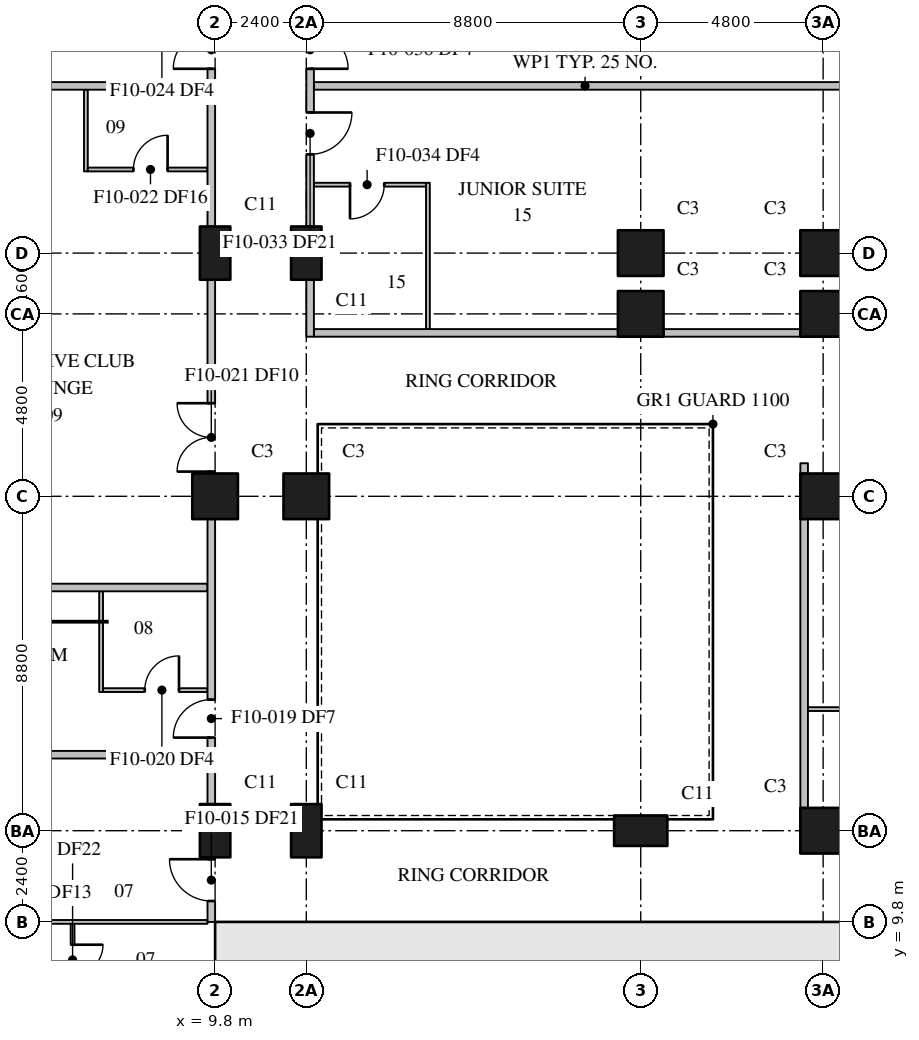
"""IFC4 building model, lengths in metres.
Left out: names, types, materials, properties, quantities, classifications, styles, units other than length and angle.
Written with IfcOpenShell. Run it as: python <this file> out.ifc"""

import sys

from ifc_helpers import new_model, si_unit, direction, frame, frame_2d, origin, origin_2d, place, context, subcontext, project, spatial, rectangle, extrude, element, fill, save


model = new_model("IFC4")
c1 = context("Model", 3, precision=1e-05, world=origin(), true_north=direction((0.0, 1.0)))
c2 = subcontext(c1, "Body", "Model", "MODEL_VIEW")
j1 = project(units=[si_unit("LENGTHUNIT", "METRE"), si_unit("PLANEANGLEUNIT", "RADIAN")], contexts=[c1])
p1 = place(None, origin())
s1 = spatial("IfcSite", under=j1, at=p1, CompositionType="ELEMENT")
p2 = place(p1, origin())
s2 = spatial("IfcBuilding", under=s1, at=p2, CompositionType="ELEMENT")
p3 = place(p2, frame((0.0, 0.0, 101.9)))
s3 = spatial("IfcBuildingStorey", under=s2, at=p3, CompositionType="ELEMENT", Elevation=101.9)
p4 = place(p3, frame((9.8, 12.2, 0.0), z_axis=(0.0, 0.0, 1.0), x_axis=(0.0, 1.0, 0.0)))
e1 = element("IfcColumn", 1, at=p4, inside=s3, PredefinedType="COLUMN", context=c2, shape_type="SweptSolid", body=[
    extrude(rectangle(XDim=1.4, YDim=0.8, at=origin_2d()), origin(), (0.0, 0.0, 1.0), 5.5),
])
p5 = place(p3, frame((9.8, 21.0, 0.0), z_axis=(0.0, 0.0, 1.0), x_axis=(1.0, 0.0, 0.0)))
e2 = element("IfcColumn", 2, at=p5, inside=s3, PredefinedType="COLUMN", context=c2, shape_type="SweptSolid", body=[
    extrude(rectangle(XDim=1.2, YDim=1.2, at=origin_2d()), origin(), (0.0, 0.0, 1.0), 5.5),
])
for number, where, z_axis, x_axis in (
    (3, (9.8, 27.4, 0.0), (0.0, 0.0, 1.0), (0.0, 1.0, 0.0)),
    (4, (12.2, 12.2, 0.0), (0.0, 0.0, 1.0), (0.0, 1.0, 0.0)),
):
    element("IfcColumn", number, at=place(p3, frame(where, z_axis=z_axis, x_axis=x_axis)), inside=s3, PredefinedType="COLUMN", context=c2, shape_type="SweptSolid", body=[
        extrude(rectangle(XDim=1.4, YDim=0.8, at=origin_2d()), origin(), (0.0, 0.0, 1.0), 5.5),
    ])
p6 = place(p3, frame((12.2, 21.0, 0.0), z_axis=(0.0, 0.0, 1.0), x_axis=(1.0, 0.0, 0.0)))
e5 = element("IfcColumn", 5, at=p6, inside=s3, PredefinedType="COLUMN", context=c2, shape_type="SweptSolid", body=[
    extrude(rectangle(XDim=1.2, YDim=1.2, at=origin_2d()), origin(), (0.0, 0.0, 1.0), 5.5),
])
for number, where, z_axis, x_axis in (
    (6, (12.2, 27.4, 0.0), (0.0, 0.0, 1.0), (0.0, 1.0, 0.0)),
    (7, (21.0, 12.2, 0.0), (0.0, 0.0, 1.0), (1.0, 0.0, 0.0)),
):
    element("IfcColumn", number, at=place(p3, frame(where, z_axis=z_axis, x_axis=x_axis)), inside=s3, PredefinedType="COLUMN", context=c2, shape_type="SweptSolid", body=[
        extrude(rectangle(XDim=1.4, YDim=0.8, at=origin_2d()), origin(), (0.0, 0.0, 1.0), 5.5),
    ])
for number, where, z_axis, x_axis in (
    (8, (21.0, 25.8, 0.0), (0.0, 0.0, 1.0), (1.0, 0.0, 0.0)),
    (9, (21.0, 27.4, 0.0), (0.0, 0.0, 1.0), (1.0, 0.0, 0.0)),
    (10, (25.8, 12.2, 0.0), (0.0, 0.0, 1.0), (1.0, 0.0, 0.0)),
    (11, (25.8, 21.0, 0.0), (0.0, 0.0, 1.0), (1.0, 0.0, 0.0)),
    (12, (25.8, 25.8, 0.0), (0.0, 0.0, 1.0), (1.0, 0.0, 0.0)),
    (13, (25.8, 27.4, 0.0), (0.0, 0.0, 1.0), (1.0, 0.0, 0.0)),
):
    element("IfcColumn", number, at=place(p3, frame(where, z_axis=z_axis, x_axis=x_axis)), inside=s3, PredefinedType="COLUMN", context=c2, shape_type="SweptSolid", body=[
        extrude(rectangle(XDim=1.2, YDim=1.2, at=origin_2d()), origin(), (0.0, 0.0, 1.0), 5.5),
    ])
p7 = place(p3, frame((10.6, 1.2, 0.0), z_axis=(0.0, 0.0, 1.0), x_axis=(0.0, 1.0, 0.0)))
e14 = element("IfcWall", 14, at=p7, inside=s3, PredefinedType="SHEAR", context=c2, shape_type="SweptSolid", body=[
    extrude(rectangle(XDim=8.6, YDim=0.8, at=frame_2d((4.3, 0.0))), origin(), (0.0, 0.0, 1.0), 5.5),
])
p8 = place(p3, frame((9.8, 9.6, 0.0), z_axis=(0.0, 0.0, 1.0), x_axis=(1.0, 0.0, 0.0)))
e15 = element("IfcWall", 15, at=p8, inside=s3, PredefinedType="SHEAR", context=c2, shape_type="SweptSolid", body=[
    extrude(rectangle(XDim=4.3, YDim=0.4, at=frame_2d((2.15, 0.0))), origin(), (0.0, 0.0, 1.0), 5.5),
])
p9 = place(p8, frame((2.05, 0.0, 0.0)))
e16 = element("IfcOpeningElement", 16, at=p9, cuts=e15, PredefinedType="OPENING", context=c2, shape_type="SweptSolid", body=[
    extrude(rectangle(XDim=1.2, YDim=2.1, at=frame_2d((0.6, 1.05))), frame((0.0, 0.21, 0.0), z_axis=(0.0, -1.0, 0.0), x_axis=(1.0, 0.0, 0.0)), (0.0, 0.0, 1.0), 0.42),
])
p10 = place(p3, frame((14.1, 9.6, 0.0), z_axis=(0.0, 0.0, 1.0), x_axis=(1.0, 0.0, 0.0)))
e17 = element("IfcWall", 17, at=p10, inside=s3, PredefinedType="SHEAR", context=c2, shape_type="SweptSolid", body=[
    extrude(rectangle(XDim=10.4, YDim=0.4, at=frame_2d((5.2, 0.0))), origin(), (0.0, 0.0, 1.0), 5.5),
])
p11 = place(p3, frame((14.1, 1.2, 0.0), z_axis=(0.0, 0.0, 1.0), x_axis=(0.0, 1.0, 0.0)))
e18 = element("IfcWall", 18, at=p11, inside=s3, PredefinedType="SHEAR", context=c2, shape_type="SweptSolid", body=[
    extrude(rectangle(XDim=8.4, YDim=0.4, at=frame_2d((4.2, 0.0))), origin(), (0.0, 0.0, 1.0), 5.5),
])
p12 = place(p11, frame((4.45, 0.0, 0.0)))
e19 = element("IfcOpeningElement", 19, at=p12, cuts=e18, PredefinedType="OPENING", context=c2, shape_type="SweptSolid", body=[
    extrude(rectangle(XDim=0.9, YDim=2.1, at=frame_2d((0.45, 1.05))), frame((0.0, 0.21, 0.0), z_axis=(0.0, -1.0, 0.0), x_axis=(1.0, 0.0, 0.0)), (0.0, 0.0, 1.0), 0.42),
])
for number, where, z_axis, x_axis in (
    (20, (16.7, 7.0, 0.0), (0.0, 0.0, 1.0), (0.0, 1.0, 0.0)),
    (21, (19.3, 7.0, 0.0), (0.0, 0.0, 1.0), (0.0, 1.0, 0.0)),
    (22, (21.9, 7.0, 0.0), (0.0, 0.0, 1.0), (0.0, 1.0, 0.0)),
    (23, (24.5, 7.0, 0.0), (0.0, 0.0, 1.0), (0.0, 1.0, 0.0)),
):
    element("IfcWall", number, at=place(p3, frame(where, z_axis=z_axis, x_axis=x_axis)), inside=s3, PredefinedType="SHEAR", context=c2, shape_type="SweptSolid", body=[
        extrude(rectangle(XDim=2.4, YDim=0.25, at=frame_2d((1.2, 0.0))), origin(), (0.0, 0.0, 1.0), 5.5),
    ])
p13 = place(p3, frame((25.3, 12.8, 0.0), z_axis=(0.0, 0.0, 1.0), x_axis=(0.0, 1.0, 0.0)))
e24 = element("IfcWall", 24, at=p13, inside=s3, PredefinedType="PARTITIONING", context=c2, shape_type="SweptSolid", body=[
    extrude(rectangle(XDim=7.6, YDim=0.2, at=frame_2d((3.8, 0.0))), origin(), (0.0, 0.0, 1.0), 5.2),
])
p14 = place(p3, frame((25.3, 21.6, 0.0), z_axis=(0.0, 0.0, 1.0), x_axis=(0.0, 1.0, 0.0)))
e25 = element("IfcWall", 25, at=p14, inside=s3, PredefinedType="PARTITIONING", context=c2, shape_type="SweptSolid", body=[
    extrude(rectangle(XDim=0.27, YDim=0.2, at=frame_2d((0.135, 0.0))), origin(), (0.0, 0.0, 1.0), 5.2),
])
p15 = place(p3, frame((9.7, 9.8, 0.0), z_axis=(0.0, 0.0, 1.0), x_axis=(0.0, 1.0, 0.0)))
e26 = element("IfcWall", 26, at=p15, inside=s3, PredefinedType="PARTITIONING", context=c2, shape_type="SweptSolid", body=[
    extrude(rectangle(XDim=1.7, YDim=0.2, at=frame_2d((0.85, 0.0))), origin(), (0.0, 0.0, 1.0), 5.2),
])
p16 = place(p15, frame((0.55, 0.0, 0.0)))
e27 = element("IfcOpeningElement", 27, at=p16, cuts=e26, PredefinedType="OPENING", context=c2, shape_type="SweptSolid", body=[
    extrude(rectangle(XDim=1.1, YDim=2.1, at=frame_2d((0.55, 1.05))), frame((0.0, 0.11, 0.0), z_axis=(0.0, -1.0, 0.0), x_axis=(1.0, 0.0, 0.0)), (0.0, 0.0, 1.0), 0.22),
])
p17 = place(p3, frame((9.7, 12.9, 0.0), z_axis=(0.0, 0.0, 1.0), x_axis=(0.0, 1.0, 0.0)))
e28 = element("IfcWall", 28, at=p17, inside=s3, PredefinedType="PARTITIONING", context=c2, shape_type="SweptSolid", body=[
    extrude(rectangle(XDim=7.5, YDim=0.2, at=frame_2d((3.75, 0.0))), origin(), (0.0, 0.0, 1.0), 5.2),
])
p18 = place(p17, frame((1.75, 0.0, 0.0)))
e29 = element("IfcOpeningElement", 29, at=p18, cuts=e28, PredefinedType="OPENING", context=c2, shape_type="SweptSolid", body=[
    extrude(rectangle(XDim=1.0, YDim=2.1, at=frame_2d((0.5, 1.05))), frame((0.0, 0.11, 0.0), z_axis=(0.0, -1.0, 0.0), x_axis=(1.0, 0.0, 0.0)), (0.0, 0.0, 1.0), 0.22),
])
p19 = place(p3, frame((9.7, 21.6, 0.0), z_axis=(0.0, 0.0, 1.0), x_axis=(0.0, 1.0, 0.0)))
e30 = element("IfcWall", 30, at=p19, inside=s3, PredefinedType="PARTITIONING", context=c2, shape_type="SweptSolid", body=[
    extrude(rectangle(XDim=5.1, YDim=0.2, at=frame_2d((2.55, 0.0))), origin(), (0.0, 0.0, 1.0), 5.2),
])
p20 = place(p19, frame((0.05, 0.0, 0.0)))
e31 = element("IfcOpeningElement", 31, at=p20, cuts=e30, PredefinedType="OPENING", context=c2, shape_type="SweptSolid", body=[
    extrude(rectangle(XDim=1.8, YDim=2.1, at=frame_2d((0.9, 1.05))), frame((0.0, 0.11, 0.0), z_axis=(0.0, -1.0, 0.0), x_axis=(1.0, 0.0, 0.0)), (0.0, 0.0, 1.0), 0.22),
])
p21 = place(p3, frame((9.7, 28.1, 0.0), z_axis=(0.0, 0.0, 1.0), x_axis=(0.0, 1.0, 0.0)))
e32 = element("IfcWall", 32, at=p21, inside=s3, PredefinedType="PARTITIONING", context=c2, shape_type="SweptSolid", body=[
    extrude(rectangle(XDim=7.4, YDim=0.2, at=frame_2d((3.7, 0.0))), origin(), (0.0, 0.0, 1.0), 5.2),
])
p22 = place(p21, frame((4.15, 0.0, 0.0)))
e33 = element("IfcOpeningElement", 33, at=p22, cuts=e32, PredefinedType="OPENING", context=c2, shape_type="SweptSolid", body=[
    extrude(rectangle(XDim=1.0, YDim=2.1, at=frame_2d((0.5, 1.05))), frame((0.0, 0.11, 0.0), z_axis=(0.0, -1.0, 0.0), x_axis=(1.0, 0.0, 0.0)), (0.0, 0.0, 1.0), 0.22),
])
for number, where, z_axis, x_axis in (
    (34, (0.31, 14.2, 0.0), (0.0, 0.0, 1.0), (1.0, 0.0, 0.0)),
    (35, (0.31, 18.6, 0.0), (0.0, 0.0, 1.0), (1.0, 0.0, 0.0)),
    (36, (0.31, 31.8, 0.0), (0.0, 0.0, 1.0), (1.0, 0.0, 0.0)),
):
    element("IfcWall", number, at=place(p3, frame(where, z_axis=z_axis, x_axis=x_axis)), inside=s3, PredefinedType="PARTITIONING", context=c2, shape_type="SweptSolid", body=[
        extrude(rectangle(XDim=9.29, YDim=0.2, at=frame_2d((4.645, 0.0))), origin(), (0.0, 0.0, 1.0), 5.2),
    ])
p23 = place(p3, frame((12.4, 31.8, 0.0), z_axis=(0.0, 0.0, 1.0), x_axis=(1.0, 0.0, 0.0)))
e37 = element("IfcWall", 37, at=p23, inside=s3, PredefinedType="PARTITIONING", context=c2, shape_type="SweptSolid", body=[
    extrude(rectangle(XDim=14.27, YDim=0.2, at=frame_2d((7.135, 0.0))), origin(), (0.0, 0.0, 1.0), 5.2),
])
p24 = place(p3, frame((12.3, 25.2, 0.0), z_axis=(0.0, 0.0, 1.0), x_axis=(0.0, 1.0, 0.0)))
e38 = element("IfcWall", 38, at=p24, inside=s3, PredefinedType="PARTITIONING", context=c2, shape_type="SweptSolid", body=[
    extrude(rectangle(XDim=1.5, YDim=0.2, at=frame_2d((0.75, 0.0))), origin(), (0.0, 0.0, 1.0), 5.2),
])
p25 = place(p3, frame((12.3, 35.5, 0.0), z_axis=(0.0, 0.0, 1.0), x_axis=(0.0, -1.0, 0.0)))
e39 = element("IfcWall", 39, at=p25, inside=s3, PredefinedType="PARTITIONING", context=c2, shape_type="SweptSolid", body=[
    extrude(rectangle(XDim=7.4, YDim=0.2, at=frame_2d((3.7, 0.0))), origin(), (0.0, 0.0, 1.0), 5.2),
])
p26 = place(p25, frame((4.4, 0.0, 0.0)))
e40 = element("IfcOpeningElement", 40, at=p26, cuts=e39, PredefinedType="OPENING", context=c2, shape_type="SweptSolid", body=[
    extrude(rectangle(XDim=1.1, YDim=2.1, at=frame_2d((0.55, 1.05))), frame((0.0, 0.11, 0.0), z_axis=(0.0, -1.0, 0.0), x_axis=(1.0, 0.0, 0.0)), (0.0, 0.0, 1.0), 0.22),
])
p27 = place(p25, frame((2.25, 0.0, 0.0)))
e41 = element("IfcOpeningElement", 41, at=p27, cuts=e39, PredefinedType="OPENING", context=c2, shape_type="SweptSolid", body=[
    extrude(rectangle(XDim=1.0, YDim=2.1, at=frame_2d((0.5, 1.05))), frame((0.0, 0.11, 0.0), z_axis=(0.0, -1.0, 0.0), x_axis=(1.0, 0.0, 0.0)), (0.0, 0.0, 1.0), 0.22),
])
p28 = place(p3, frame((12.4, 25.3, 0.0), z_axis=(0.0, 0.0, 1.0), x_axis=(1.0, 0.0, 0.0)))
e42 = element("IfcWall", 42, at=p28, inside=s3, PredefinedType="PARTITIONING", context=c2, shape_type="SweptSolid", body=[
    extrude(rectangle(XDim=8.0, YDim=0.2, at=frame_2d((4.0, 0.0))), origin(), (0.0, 0.0, 1.0), 5.2),
])
p29 = place(p3, frame((21.6, 25.3, 0.0), z_axis=(0.0, 0.0, 1.0), x_axis=(1.0, 0.0, 0.0)))
e43 = element("IfcWall", 43, at=p29, inside=s3, PredefinedType="PARTITIONING", context=c2, shape_type="SweptSolid", body=[
    extrude(rectangle(XDim=3.6, YDim=0.2, at=frame_2d((1.8, 0.0))), origin(), (0.0, 0.0, 1.0), 5.2),
])
p30 = place(p3, frame((25.4, 15.4, 0.0), z_axis=(0.0, 0.0, 1.0), x_axis=(1.0, 0.0, 0.0)))
e44 = element("IfcWall", 44, at=p30, inside=s3, PredefinedType="PARTITIONING", context=c2, shape_type="SweptSolid", body=[
    extrude(rectangle(XDim=3.15, YDim=0.1, at=frame_2d((1.575, 0.0))), origin(), (0.0, 0.0, 1.0), 5.2),
])
p31 = place(p3, frame((6.05, 9.75, 0.0), z_axis=(0.0, 0.0, 1.0), x_axis=(0.0, -1.0, 0.0)))
e45 = element("IfcWall", 45, at=p31, inside=s3, PredefinedType="PARTITIONING", context=c2, shape_type="SweptSolid", body=[
    extrude(rectangle(XDim=4.4, YDim=0.1, at=frame_2d((2.2, 0.0))), origin(), (0.0, 0.0, 1.0), 5.2),
])
p32 = place(p31, frame((2.7, 0.0, 0.0)))
e46 = element("IfcOpeningElement", 46, at=p32, cuts=e45, PredefinedType="OPENING", context=c2, shape_type="SweptSolid", body=[
    extrude(rectangle(XDim=0.9, YDim=2.1, at=frame_2d((0.45, 1.05))), frame((0.0, 0.06, 0.0), z_axis=(0.0, -1.0, 0.0), x_axis=(1.0, 0.0, 0.0)), (0.0, 0.0, 1.0), 0.12),
])
p33 = place(p31, frame((0.55, 0.0, 0.0)))
e47 = element("IfcOpeningElement", 47, at=p33, cuts=e45, PredefinedType="OPENING", context=c2, shape_type="SweptSolid", body=[
    extrude(rectangle(XDim=0.8, YDim=2.1, at=frame_2d((0.4, 1.05))), frame((0.0, 0.06, 0.0), z_axis=(0.0, -1.0, 0.0), x_axis=(1.0, 0.0, 0.0)), (0.0, 0.0, 1.0), 0.12),
])
p34 = place(p3, frame((9.6, 9.8, 0.0), z_axis=(0.0, 0.0, 1.0), x_axis=(-1.0, 0.0, 0.0)))
e48 = element("IfcWall", 48, at=p34, inside=s3, PredefinedType="PARTITIONING", context=c2, shape_type="SweptSolid", body=[
    extrude(rectangle(XDim=8.0, YDim=0.1, at=frame_2d((4.0, 0.0))), origin(), (0.0, 0.0, 1.0), 5.2),
])
p35 = place(p34, frame((4.65, 0.0, 0.0)))
e49 = element("IfcOpeningElement", 49, at=p35, cuts=e48, PredefinedType="OPENING", context=c2, shape_type="SweptSolid", body=[
    extrude(rectangle(XDim=1.0, YDim=2.1, at=frame_2d((0.5, 1.05))), frame((0.0, 0.06, 0.0), z_axis=(0.0, -1.0, 0.0), x_axis=(1.0, 0.0, 0.0)), (0.0, 0.0, 1.0), 0.12),
])
p36 = place(p3, frame((6.8, 15.85, 0.0), z_axis=(0.0, 0.0, 1.0), x_axis=(0.0, 1.0, 0.0)))
e50 = element("IfcWall", 50, at=p36, inside=s3, PredefinedType="PARTITIONING", context=c2, shape_type="SweptSolid", body=[
    extrude(rectangle(XDim=2.65, YDim=0.1, at=frame_2d((1.325, 0.0))), origin(), (0.0, 0.0, 1.0), 5.2),
])
p37 = place(p3, frame((6.85, 15.9, 0.0), z_axis=(0.0, 0.0, 1.0), x_axis=(1.0, 0.0, 0.0)))
e51 = element("IfcWall", 51, at=p37, inside=s3, PredefinedType="PARTITIONING", context=c2, shape_type="SweptSolid", body=[
    extrude(rectangle(XDim=2.75, YDim=0.1, at=frame_2d((1.375, 0.0))), origin(), (0.0, 0.0, 1.0), 5.2),
])
p38 = place(p37, frame((1.1, 0.0, 0.0)))
e52 = element("IfcOpeningElement", 52, at=p38, cuts=e51, PredefinedType="OPENING", context=c2, shape_type="SweptSolid", body=[
    extrude(rectangle(XDim=0.9, YDim=2.1, at=frame_2d((0.45, 1.05))), frame((0.0, 0.06, 0.0), z_axis=(0.0, -1.0, 0.0), x_axis=(1.0, 0.0, 0.0)), (0.0, 0.0, 1.0), 0.12),
])
p39 = place(p3, frame((6.4, 29.55, 0.0), z_axis=(0.0, 0.0, 1.0), x_axis=(0.0, 1.0, 0.0)))
e53 = element("IfcWall", 53, at=p39, inside=s3, PredefinedType="PARTITIONING", context=c2, shape_type="SweptSolid", body=[
    extrude(rectangle(XDim=2.15, YDim=0.1, at=frame_2d((1.075, 0.0))), origin(), (0.0, 0.0, 1.0), 5.2),
])
p40 = place(p3, frame((6.45, 29.6, 0.0), z_axis=(0.0, 0.0, 1.0), x_axis=(1.0, 0.0, 0.0)))
e54 = element("IfcWall", 54, at=p40, inside=s3, PredefinedType="PARTITIONING", context=c2, shape_type="SweptSolid", body=[
    extrude(rectangle(XDim=3.15, YDim=0.1, at=frame_2d((1.575, 0.0))), origin(), (0.0, 0.0, 1.0), 5.2),
])
p41 = place(p40, frame((1.2, 0.0, 0.0)))
e55 = element("IfcOpeningElement", 55, at=p41, cuts=e54, PredefinedType="OPENING", context=c2, shape_type="SweptSolid", body=[
    extrude(rectangle(XDim=0.9, YDim=2.1, at=frame_2d((0.45, 1.05))), frame((0.0, 0.06, 0.0), z_axis=(0.0, -1.0, 0.0), x_axis=(1.0, 0.0, 0.0)), (0.0, 0.0, 1.0), 0.12),
])
p42 = place(p3, frame((15.4, 25.4, 0.0), z_axis=(0.0, 0.0, 1.0), x_axis=(0.0, 1.0, 0.0)))
e56 = element("IfcWall", 56, at=p42, inside=s3, PredefinedType="PARTITIONING", context=c2, shape_type="SweptSolid", body=[
    extrude(rectangle(XDim=3.85, YDim=0.1, at=frame_2d((1.925, 0.0))), origin(), (0.0, 0.0, 1.0), 5.2),
])
p43 = place(p3, frame((15.35, 29.2, 0.0), z_axis=(0.0, 0.0, 1.0), x_axis=(-1.0, 0.0, 0.0)))
e57 = element("IfcWall", 57, at=p43, inside=s3, PredefinedType="PARTITIONING", context=c2, shape_type="SweptSolid", body=[
    extrude(rectangle(XDim=2.95, YDim=0.1, at=frame_2d((1.475, 0.0))), origin(), (0.0, 0.0, 1.0), 5.2),
])
p44 = place(p43, frame((1.1, 0.0, 0.0)))
e58 = element("IfcOpeningElement", 58, at=p44, cuts=e57, PredefinedType="OPENING", context=c2, shape_type="SweptSolid", body=[
    extrude(rectangle(XDim=0.9, YDim=2.1, at=frame_2d((0.45, 1.05))), frame((0.0, 0.06, 0.0), z_axis=(0.0, -1.0, 0.0), x_axis=(1.0, 0.0, 0.0)), (0.0, 0.0, 1.0), 0.12),
])
p45 = place(p9, frame((1.2, 0.0, 0.0), z_axis=(0.0, 0.0, 1.0), x_axis=(-1.0, 0.0, 0.0)))
e59 = element("IfcDoor", 59, at=p45, inside=s3, OperationType="SINGLE_SWING_LEFT", PredefinedType="DOOR", context=c2, shape_type="SweptSolid", body=[
    extrude(rectangle(XDim=1.2, YDim=2.1, at=frame_2d((0.6, 1.05))), frame((0.0, 0.025, 0.0), z_axis=(0.0, -1.0, 0.0), x_axis=(1.0, 0.0, 0.0)), (0.0, 0.0, 1.0), 0.05),
])
fill(e16, e59)
p46 = place(p16, origin())
e60 = element("IfcDoor", 60, at=p46, inside=s3, OperationType="SINGLE_SWING_RIGHT", PredefinedType="DOOR", context=c2, shape_type="SweptSolid", body=[
    extrude(rectangle(XDim=1.1, YDim=2.1, at=frame_2d((0.55, 1.05))), frame((0.0, 0.025, 0.0), z_axis=(0.0, -1.0, 0.0), x_axis=(1.0, 0.0, 0.0)), (0.0, 0.0, 1.0), 0.05),
])
fill(e27, e60)
p47 = place(p33, origin())
e61 = element("IfcDoor", 61, at=p47, inside=s3, OperationType="SINGLE_SWING_LEFT", PredefinedType="DOOR", context=c2, shape_type="SweptSolid", body=[
    extrude(rectangle(XDim=0.8, YDim=2.1, at=frame_2d((0.4, 1.05))), frame((0.0, 0.025, 0.0), z_axis=(0.0, -1.0, 0.0), x_axis=(1.0, 0.0, 0.0)), (0.0, 0.0, 1.0), 0.05),
])
fill(e47, e61)
p48 = place(p18, origin())
e62 = element("IfcDoor", 62, at=p48, inside=s3, OperationType="SINGLE_SWING_LEFT", PredefinedType="DOOR", context=c2, shape_type="SweptSolid", body=[
    extrude(rectangle(XDim=1.0, YDim=2.1, at=frame_2d((0.5, 1.05))), frame((0.0, 0.025, 0.0), z_axis=(0.0, -1.0, 0.0), x_axis=(1.0, 0.0, 0.0)), (0.0, 0.0, 1.0), 0.05),
])
fill(e29, e62)
p49 = place(p38, origin())
e63 = element("IfcDoor", 63, at=p49, inside=s3, OperationType="SINGLE_SWING_RIGHT", PredefinedType="DOOR", context=c2, shape_type="SweptSolid", body=[
    extrude(rectangle(XDim=0.9, YDim=2.1, at=frame_2d((0.45, 1.05))), frame((0.0, 0.025, 0.0), z_axis=(0.0, -1.0, 0.0), x_axis=(1.0, 0.0, 0.0)), (0.0, 0.0, 1.0), 0.05),
])
fill(e52, e63)
p50 = place(p20, origin())
e64 = element("IfcDoor", 64, at=p50, inside=s3, OperationType="DOUBLE_DOOR_SINGLE_SWING", PredefinedType="DOOR", context=c2, shape_type="SweptSolid", body=[
    extrude(rectangle(XDim=1.8, YDim=2.1, at=frame_2d((0.9, 1.05))), frame((0.0, 0.025, 0.0), z_axis=(0.0, -1.0, 0.0), x_axis=(1.0, 0.0, 0.0)), (0.0, 0.0, 1.0), 0.05),
])
fill(e31, e64)
p51 = place(p41, origin())
e65 = element("IfcDoor", 65, at=p51, inside=s3, OperationType="SINGLE_SWING_RIGHT", PredefinedType="DOOR", context=c2, shape_type="SweptSolid", body=[
    extrude(rectangle(XDim=0.9, YDim=2.1, at=frame_2d((0.45, 1.05))), frame((0.0, 0.025, 0.0), z_axis=(0.0, -1.0, 0.0), x_axis=(1.0, 0.0, 0.0)), (0.0, 0.0, 1.0), 0.05),
])
fill(e55, e65)
p52 = place(p22, origin())
e66 = element("IfcDoor", 66, at=p52, inside=s3, OperationType="SINGLE_SWING_LEFT", PredefinedType="DOOR", context=c2, shape_type="SweptSolid", body=[
    extrude(rectangle(XDim=1.0, YDim=2.1, at=frame_2d((0.5, 1.05))), frame((0.0, 0.025, 0.0), z_axis=(0.0, -1.0, 0.0), x_axis=(1.0, 0.0, 0.0)), (0.0, 0.0, 1.0), 0.05),
])
fill(e33, e66)
p53 = place(p26, origin())
e67 = element("IfcDoor", 67, at=p53, inside=s3, OperationType="SINGLE_SWING_LEFT", PredefinedType="DOOR", context=c2, shape_type="SweptSolid", body=[
    extrude(rectangle(XDim=1.1, YDim=2.1, at=frame_2d((0.55, 1.05))), frame((0.0, 0.025, 0.0), z_axis=(0.0, -1.0, 0.0), x_axis=(1.0, 0.0, 0.0)), (0.0, 0.0, 1.0), 0.05),
])
fill(e40, e67)
p54 = place(p44, origin())
e68 = element("IfcDoor", 68, at=p54, inside=s3, OperationType="SINGLE_SWING_RIGHT", PredefinedType="DOOR", context=c2, shape_type="SweptSolid", body=[
    extrude(rectangle(XDim=0.9, YDim=2.1, at=frame_2d((0.45, 1.05))), frame((0.0, 0.025, 0.0), z_axis=(0.0, -1.0, 0.0), x_axis=(1.0, 0.0, 0.0)), (0.0, 0.0, 1.0), 0.05),
])
fill(e58, e68)
p55 = place(p27, origin())
e69 = element("IfcDoor", 69, at=p55, inside=s3, OperationType="SINGLE_SWING_RIGHT", PredefinedType="DOOR", context=c2, shape_type="SweptSolid", body=[
    extrude(rectangle(XDim=1.0, YDim=2.1, at=frame_2d((0.5, 1.05))), frame((0.0, 0.025, 0.0), z_axis=(0.0, -1.0, 0.0), x_axis=(1.0, 0.0, 0.0)), (0.0, 0.0, 1.0), 0.05),
])
fill(e41, e69)
save(model, sys.argv[1])
